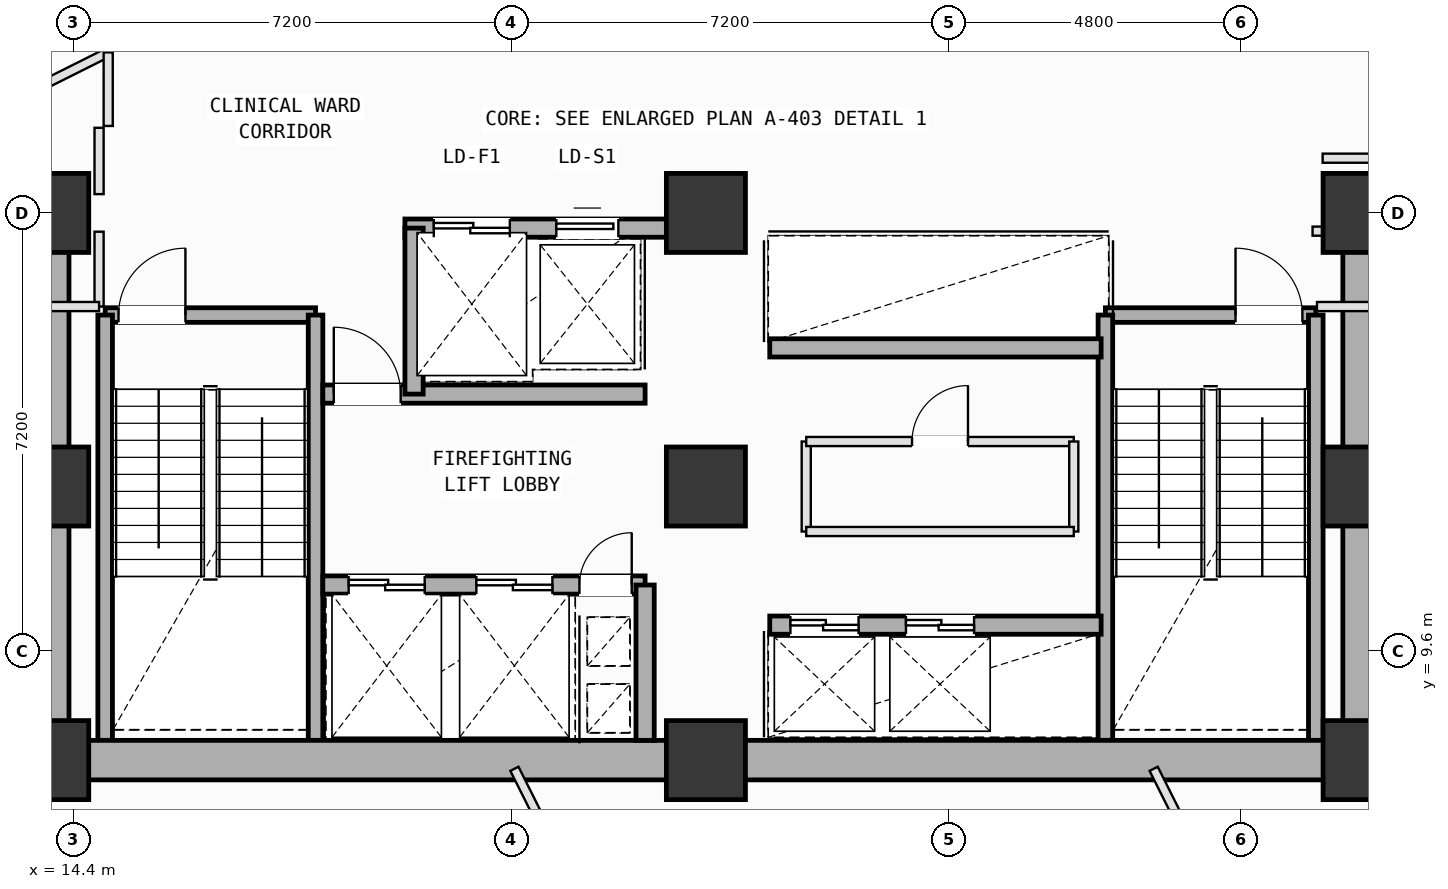
"""IFC4 building model, lengths in metres.
Left out: names, types, materials, properties, quantities, classifications, styles, units other than length and angle.
Written with IfcOpenShell. Run it as: python <this file> out.ifc"""

import sys

from ifc_helpers import new_model, si_unit, direction, frame, frame_2d, origin, origin_2d, place, context, subcontext, project, spatial, rectangle, extrude, element, fill, save


model = new_model("IFC4")
c1 = context("Model", 3, precision=1e-05, world=origin(), true_north=direction((0.0, 1.0)))
c2 = subcontext(c1, "Body", "Model", "MODEL_VIEW")
j1 = project(units=[si_unit("LENGTHUNIT", "METRE"), si_unit("PLANEANGLEUNIT", "RADIAN")], contexts=[c1])
p1 = place(None, origin())
s1 = spatial("IfcSite", under=j1, at=p1, CompositionType="ELEMENT")
p2 = place(p1, origin())
s2 = spatial("IfcBuilding", under=s1, at=p2, CompositionType="ELEMENT")
p3 = place(p2, frame((0.0, 0.0, 136.4)))
s3 = spatial("IfcBuildingStorey", under=s2, at=p3, CompositionType="ELEMENT", Elevation=136.4)
for number, where, z_axis, x_axis in (
    (1, (14.0, 7.8, 0.0), (0.0, 0.0, 1.0), (1.0, 0.0, 0.0)),
    (2, (14.0, 12.3, 0.0), (0.0, 0.0, 1.0), (1.0, 0.0, 0.0)),
    (3, (14.0, 16.8, 0.0), (0.0, 0.0, 1.0), (1.0, 0.0, 0.0)),
    (4, (24.8, 7.8, 0.0), (0.0, 0.0, 1.0), (1.0, 0.0, 0.0)),
    (5, (24.8, 12.3, 0.0), (0.0, 0.0, 1.0), (1.0, 0.0, 0.0)),
    (6, (24.8, 16.8, 0.0), (0.0, 0.0, 1.0), (1.0, 0.0, 0.0)),
    (7, (35.6, 7.8, 0.0), (0.0, 0.0, 1.0), (1.0, 0.0, 0.0)),
    (8, (35.6, 12.3, 0.0), (0.0, 0.0, 1.0), (1.0, 0.0, 0.0)),
    (9, (35.6, 16.8, 0.0), (0.0, 0.0, 1.0), (1.0, 0.0, 0.0)),
):
    element("IfcColumn", number, at=place(p3, frame(where, z_axis=z_axis, x_axis=x_axis)), inside=s3, PredefinedType="COLUMN", context=c2, shape_type="SweptSolid", body=[
        extrude(rectangle(XDim=1.3, YDim=1.3, at=origin_2d()), origin(), (0.0, 0.0, 1.0), 4.0),
    ])
p4 = place(p3, frame((14.92, 15.12, 0.0), z_axis=(0.0, 0.0, 1.0), x_axis=(1.0, 0.0, 0.0)))
e10 = element("IfcWall", 10, at=p4, inside=s3, PredefinedType="SOLIDWALL", context=c2, shape_type="SweptSolid", body=[
    extrude(rectangle(XDim=3.46, YDim=0.24, at=frame_2d((1.73, 0.0))), origin(), (0.0, 0.0, 1.0), 3.78),
])
p5 = place(p4, frame((0.22, 0.0, 0.0)))
e11 = element("IfcOpeningElement", 11, at=p5, cuts=e10, PredefinedType="OPENING", context=c2, shape_type="SweptSolid", body=[
    extrude(rectangle(XDim=1.1, YDim=2.15, at=frame_2d((0.55, 1.075))), frame((0.0, 0.13, 0.0), z_axis=(0.0, -1.0, 0.0), x_axis=(1.0, 0.0, 0.0)), (0.0, 0.0, 1.0), 0.26),
])
for number, where, z_axis, x_axis in (
    (12, (18.38, 15.12, 0.0), (0.0, 0.0, 1.0), (0.0, -1.0, 0.0)),
    (13, (14.92, 8.125, 0.0), (0.0, 0.0, 1.0), (0.0, 1.0, 0.0)),
):
    element("IfcWall", number, at=place(p3, frame(where, z_axis=z_axis, x_axis=x_axis)), inside=s3, PredefinedType="SOLIDWALL", context=c2, shape_type="SweptSolid", body=[
        extrude(rectangle(XDim=6.995, YDim=0.24, at=frame_2d((3.498, 0.0))), origin(), (0.0, 0.0, 1.0), 3.78),
    ])
p6 = place(p3, frame((31.37, 15.12, 0.0), z_axis=(0.0, 0.0, 1.0), x_axis=(1.0, 0.0, 0.0)))
e14 = element("IfcWall", 14, at=p6, inside=s3, PredefinedType="SOLIDWALL", context=c2, shape_type="SweptSolid", body=[
    extrude(rectangle(XDim=3.46, YDim=0.24, at=frame_2d((1.73, 0.0))), origin(), (0.0, 0.0, 1.0), 3.78),
])
p7 = place(p6, frame((2.14, 0.0, 0.0)))
e15 = element("IfcOpeningElement", 15, at=p7, cuts=e14, PredefinedType="OPENING", context=c2, shape_type="SweptSolid", body=[
    extrude(rectangle(XDim=1.1, YDim=2.15, at=frame_2d((0.55, 1.075))), frame((0.0, 0.13, 0.0), z_axis=(0.0, -1.0, 0.0), x_axis=(1.0, 0.0, 0.0)), (0.0, 0.0, 1.0), 0.26),
])
for number, where, z_axis, x_axis in (
    (16, (34.83, 15.12, 0.0), (0.0, 0.0, 1.0), (0.0, -1.0, 0.0)),
    (17, (31.37, 8.125, 0.0), (0.0, 0.0, 1.0), (0.0, 1.0, 0.0)),
):
    element("IfcWall", number, at=place(p3, frame(where, z_axis=z_axis, x_axis=x_axis)), inside=s3, PredefinedType="SOLIDWALL", context=c2, shape_type="SweptSolid", body=[
        extrude(rectangle(XDim=6.995, YDim=0.24, at=frame_2d((3.498, 0.0))), origin(), (0.0, 0.0, 1.0), 3.78),
    ])
for number, where, z_axis, x_axis in (
    (18, (14.0, 7.8, 0.0), (0.0, 0.0, 1.0), (1.0, 0.0, 0.0)),
    (19, (24.8, 7.8, 0.0), (0.0, 0.0, 1.0), (1.0, 0.0, 0.0)),
):
    element("IfcWall", number, at=place(p3, frame(where, z_axis=z_axis, x_axis=x_axis)), inside=s3, PredefinedType="SHEAR", context=c2, shape_type="SweptSolid", body=[
        extrude(rectangle(XDim=10.8, YDim=0.65, at=frame_2d((5.4, 0.0))), origin(), (0.0, 0.0, 1.0), 3.78),
    ])
for number, where, z_axis, x_axis in (
    (20, (35.6, 7.8, 0.0), (0.0, 0.0, 1.0), (0.0, 1.0, 0.0)),
    (21, (14.0, 16.8, 0.0), (0.0, 0.0, 1.0), (0.0, -1.0, 0.0)),
):
    element("IfcWall", number, at=place(p3, frame(where, z_axis=z_axis, x_axis=x_axis)), inside=s3, PredefinedType="SHEAR", context=c2, shape_type="SweptSolid", body=[
        extrude(rectangle(XDim=9.0, YDim=0.65, at=frame_2d((4.5, 0.0))), origin(), (0.0, 0.0, 1.0), 3.78),
    ])
p8 = place(p3, frame((19.85, 16.55, 0.0), z_axis=(0.0, 0.0, 1.0), x_axis=(1.0, 0.0, 0.0)))
e22 = element("IfcWall", 22, at=p8, inside=s3, PredefinedType="SOLIDWALL", context=c2, shape_type="SweptSolid", body=[
    extrude(rectangle(XDim=4.3, YDim=0.3, at=frame_2d((2.15, 0.0))), origin(), (0.0, 0.0, 1.0), 3.78),
])
p9 = place(p8, frame((0.475, 0.0, 0.0)))
e23 = element("IfcOpeningElement", 23, at=p9, cuts=e22, PredefinedType="OPENING", context=c2, shape_type="SweptSolid", body=[
    extrude(rectangle(XDim=1.25, YDim=2.18, at=frame_2d((0.625, 1.09))), frame((0.0, 0.16, 0.0), z_axis=(0.0, -1.0, 0.0), x_axis=(1.0, 0.0, 0.0)), (0.0, 0.0, 1.0), 0.32),
])
p10 = place(p8, frame((2.49, 0.0, 0.0)))
e24 = element("IfcOpeningElement", 24, at=p10, cuts=e22, PredefinedType="OPENING", context=c2, shape_type="SweptSolid", body=[
    extrude(rectangle(XDim=1.02, YDim=2.12, at=frame_2d((0.51, 1.06))), frame((0.0, 0.16, 0.0), z_axis=(0.0, -1.0, 0.0), x_axis=(1.0, 0.0, 0.0)), (0.0, 0.0, 1.0), 0.32),
])
p11 = place(p3, frame((18.5, 10.68, 0.0), z_axis=(0.0, 0.0, 1.0), x_axis=(1.0, 0.0, 0.0)))
e25 = element("IfcWall", 25, at=p11, inside=s3, PredefinedType="SOLIDWALL", context=c2, shape_type="SweptSolid", body=[
    extrude(rectangle(XDim=5.3, YDim=0.3, at=frame_2d((2.65, 0.0))), origin(), (0.0, 0.0, 1.0), 3.78),
])
p12 = place(p11, frame((4.22, 0.0, 0.0)))
e26 = element("IfcOpeningElement", 26, at=p12, cuts=e25, PredefinedType="OPENING", context=c2, shape_type="SweptSolid", body=[
    extrude(rectangle(XDim=0.86, YDim=2.06, at=frame_2d((0.43, 1.03))), frame((0.0, 0.16, 0.0), z_axis=(0.0, -1.0, 0.0), x_axis=(1.0, 0.0, 0.0)), (0.0, 0.0, 1.0), 0.32),
])
p13 = place(p11, frame((0.425, 0.0, 0.0)))
e27 = element("IfcOpeningElement", 27, at=p13, cuts=e25, PredefinedType="OPENING", context=c2, shape_type="SweptSolid", body=[
    extrude(rectangle(XDim=1.25, YDim=2.18, at=frame_2d((0.625, 1.09))), frame((0.0, 0.16, 0.0), z_axis=(0.0, -1.0, 0.0), x_axis=(1.0, 0.0, 0.0)), (0.0, 0.0, 1.0), 0.32),
])
p14 = place(p11, frame((2.525, 0.0, 0.0)))
e28 = element("IfcOpeningElement", 28, at=p14, cuts=e25, PredefinedType="OPENING", context=c2, shape_type="SweptSolid", body=[
    extrude(rectangle(XDim=1.25, YDim=2.18, at=frame_2d((0.625, 1.09))), frame((0.0, 0.16, 0.0), z_axis=(0.0, -1.0, 0.0), x_axis=(1.0, 0.0, 0.0)), (0.0, 0.0, 1.0), 0.32),
])
p15 = place(p3, frame((18.5, 13.82, 0.0), z_axis=(0.0, 0.0, 1.0), x_axis=(1.0, 0.0, 0.0)))
e29 = element("IfcWall", 29, at=p15, inside=s3, PredefinedType="SOLIDWALL", context=c2, shape_type="SweptSolid", body=[
    extrude(rectangle(XDim=5.3, YDim=0.3, at=frame_2d((2.65, 0.0))), origin(), (0.0, 0.0, 1.0), 3.78),
])
p16 = place(p15, frame((0.18, 0.0, 0.0)))
e30 = element("IfcOpeningElement", 30, at=p16, cuts=e29, PredefinedType="OPENING", context=c2, shape_type="SweptSolid", body=[
    extrude(rectangle(XDim=1.1, YDim=2.15, at=frame_2d((0.55, 1.075))), frame((0.0, 0.16, 0.0), z_axis=(0.0, -1.0, 0.0), x_axis=(1.0, 0.0, 0.0)), (0.0, 0.0, 1.0), 0.32),
])
p17 = place(p3, frame((23.8, 8.125, 0.0), z_axis=(0.0, 0.0, 1.0), x_axis=(0.0, 1.0, 0.0)))
e31 = element("IfcWall", 31, at=p17, inside=s3, PredefinedType="SOLIDWALL", context=c2, shape_type="SweptSolid", body=[
    extrude(rectangle(XDim=2.555, YDim=0.3, at=frame_2d((1.277, 0.0))), origin(), (0.0, 0.0, 1.0), 3.78),
])
p18 = place(p3, frame((20.0, 13.82, 0.0), z_axis=(0.0, 0.0, 1.0), x_axis=(0.0, 1.0, 0.0)))
e32 = element("IfcWall", 32, at=p18, inside=s3, PredefinedType="SOLIDWALL", context=c2, shape_type="SweptSolid", body=[
    extrude(rectangle(XDim=2.73, YDim=0.3, at=frame_2d((1.365, 0.0))), origin(), (0.0, 0.0, 1.0), 3.78),
])
p19 = place(p3, frame((25.85, 10.02, 0.0), z_axis=(0.0, 0.0, 1.0), x_axis=(1.0, 0.0, 0.0)))
e33 = element("IfcWall", 33, at=p19, inside=s3, PredefinedType="SOLIDWALL", context=c2, shape_type="SweptSolid", body=[
    extrude(rectangle(XDim=5.45, YDim=0.3, at=frame_2d((2.725, 0.0))), origin(), (0.0, 0.0, 1.0), 3.78),
])
p20 = place(p19, frame((0.34, 0.0, 0.0)))
e34 = element("IfcOpeningElement", 34, at=p20, cuts=e33, PredefinedType="OPENING", context=c2, shape_type="SweptSolid", body=[
    extrude(rectangle(XDim=1.12, YDim=2.15, at=frame_2d((0.56, 1.075))), frame((0.0, 0.16, 0.0), z_axis=(0.0, -1.0, 0.0), x_axis=(1.0, 0.0, 0.0)), (0.0, 0.0, 1.0), 0.32),
])
p21 = place(p19, frame((2.24, 0.0, 0.0)))
e35 = element("IfcOpeningElement", 35, at=p21, cuts=e33, PredefinedType="OPENING", context=c2, shape_type="SweptSolid", body=[
    extrude(rectangle(XDim=1.12, YDim=2.15, at=frame_2d((0.56, 1.075))), frame((0.0, 0.16, 0.0), z_axis=(0.0, -1.0, 0.0), x_axis=(1.0, 0.0, 0.0)), (0.0, 0.0, 1.0), 0.32),
])
p22 = place(p3, frame((25.85, 14.58, 0.0), z_axis=(0.0, 0.0, 1.0), x_axis=(1.0, 0.0, 0.0)))
e36 = element("IfcWall", 36, at=p22, inside=s3, PredefinedType="SOLIDWALL", context=c2, shape_type="SweptSolid", body=[
    extrude(rectangle(XDim=5.45, YDim=0.3, at=frame_2d((2.725, 0.0))), origin(), (0.0, 0.0, 1.0), 3.78),
])
p23 = place(p3, frame((26.45, 11.56, 0.0), z_axis=(0.0, 0.0, 1.0), x_axis=(0.0, 1.0, 0.0)))
e37 = element("IfcWall", 37, at=p23, inside=s3, PredefinedType="PARTITIONING", context=c2, shape_type="SweptSolid", body=[
    extrude(rectangle(XDim=1.48, YDim=0.15, at=frame_2d((0.74, 0.0))), origin(), (0.0, 0.0, 1.0), 3.78),
])
p24 = place(p3, frame((26.45, 13.04, 0.0), z_axis=(0.0, 0.0, 1.0), x_axis=(1.0, 0.0, 0.0)))
e38 = element("IfcWall", 38, at=p24, inside=s3, PredefinedType="PARTITIONING", context=c2, shape_type="SweptSolid", body=[
    extrude(rectangle(XDim=4.4, YDim=0.15, at=frame_2d((2.2, 0.0))), origin(), (0.0, 0.0, 1.0), 3.78),
])
p25 = place(p24, frame((1.74, 0.0, 0.0)))
e39 = element("IfcOpeningElement", 39, at=p25, cuts=e38, PredefinedType="OPENING", context=c2, shape_type="SweptSolid", body=[
    extrude(rectangle(XDim=0.92, YDim=2.1, at=frame_2d((0.46, 1.05))), frame((0.0, 0.085, 0.0), z_axis=(0.0, -1.0, 0.0), x_axis=(1.0, 0.0, 0.0)), (0.0, 0.0, 1.0), 0.17),
])
p26 = place(p3, frame((30.85, 13.04, 0.0), z_axis=(0.0, 0.0, 1.0), x_axis=(0.0, -1.0, 0.0)))
e40 = element("IfcWall", 40, at=p26, inside=s3, PredefinedType="PARTITIONING", context=c2, shape_type="SweptSolid", body=[
    extrude(rectangle(XDim=1.48, YDim=0.15, at=frame_2d((0.74, 0.0))), origin(), (0.0, 0.0, 1.0), 3.78),
])
p27 = place(p3, frame((30.85, 11.56, 0.0), z_axis=(0.0, 0.0, 1.0), x_axis=(-1.0, 0.0, 0.0)))
e41 = element("IfcWall", 41, at=p27, inside=s3, PredefinedType="PARTITIONING", context=c2, shape_type="SweptSolid", body=[
    extrude(rectangle(XDim=4.4, YDim=0.15, at=frame_2d((2.2, 0.0))), origin(), (0.0, 0.0, 1.0), 3.78),
])
p28 = place(p3, frame((21.651, 7.657, 0.0), z_axis=(0.0, 0.0, 1.0), x_axis=(0.447808912085, -0.894129284979, 0.0)))
e42 = element("IfcWall", 42, at=p28, inside=s3, PredefinedType="PARTITIONING", context=c2, shape_type="SweptSolid", body=[
    extrude(rectangle(XDim=12.137, YDim=0.15, at=frame_2d((6.068, 0.0))), origin(), (0.0, 0.0, 1.0), 3.78),
])
p29 = place(p3, frame((32.164, 7.657, 0.0), z_axis=(0.0, 0.0, 1.0), x_axis=(0.447686753876, -0.89419045533, 0.0)))
e43 = element("IfcWall", 43, at=p29, inside=s3, PredefinedType="PARTITIONING", context=c2, shape_type="SweptSolid", body=[
    extrude(rectangle(XDim=7.429, YDim=0.15, at=frame_2d((3.715, 0.0))), origin(), (0.0, 0.0, 1.0), 3.78),
])
p30 = place(p29, frame((3.452, 0.0, 0.0)))
e44 = element("IfcOpeningElement", 44, at=p30, cuts=e43, PredefinedType="OPENING", context=c2, shape_type="SweptSolid", body=[
    extrude(rectangle(XDim=0.86, YDim=2.06, at=frame_2d((0.43, 1.03))), frame((0.0, 0.085, 0.0), z_axis=(0.0, -1.0, 0.0), x_axis=(1.0, 0.0, 0.0)), (0.0, 0.0, 1.0), 0.17),
])
p31 = place(p3, frame((35.6, 7.5, 0.0), z_axis=(0.0, 0.0, 1.0), x_axis=(1.0, 0.0, 0.0)))
e45 = element("IfcWall", 45, at=p31, inside=s3, PredefinedType="PARTITIONING", context=c2, shape_type="SweptSolid", body=[
    extrude(rectangle(XDim=0.55, YDim=0.15, at=frame_2d((0.275, 0.0))), origin(), (0.0, 0.0, 1.0), 2.965),
])
p32 = place(p3, frame((34.777, 16.5, 0.0), z_axis=(0.0, 0.0, 1.0), x_axis=(1.0, 0.0, 0.0)))
e46 = element("IfcWall", 46, at=p32, inside=s3, PredefinedType="PARTITIONING", context=c2, shape_type="SweptSolid", body=[
    extrude(rectangle(XDim=1.723, YDim=0.15, at=frame_2d((0.861, 0.0))), origin(), (0.0, 0.0, 1.0), 2.965),
])
p33 = place(p3, frame((36.5, 17.7, 0.0), z_axis=(0.0, 0.0, 1.0), x_axis=(-1.0, 0.0, 0.0)))
e47 = element("IfcWall", 47, at=p33, inside=s3, PredefinedType="PARTITIONING", context=c2, shape_type="SweptSolid", body=[
    extrude(rectangle(XDim=1.557, YDim=0.15, at=frame_2d((0.778, 0.0))), origin(), (0.0, 0.0, 1.0), 3.78),
])
p34 = place(p3, frame((36.15, 15.26, 0.0), z_axis=(0.0, 0.0, 1.0), x_axis=(-1.0, 0.0, 0.0)))
e48 = element("IfcWall", 48, at=p34, inside=s3, PredefinedType="PARTITIONING", context=c2, shape_type="SweptSolid", body=[
    extrude(rectangle(XDim=1.3, YDim=0.15, at=frame_2d((0.65, 0.0))), origin(), (0.0, 0.0, 1.0), 3.78),
])
p35 = place(p3, frame((14.82, 18.2, 0.0), z_axis=(0.0, 0.0, 1.0), x_axis=(0.0, -1.0, 0.0)))
e49 = element("IfcWall", 49, at=p35, inside=s3, PredefinedType="PARTITIONING", context=c2, shape_type="SweptSolid", body=[
    extrude(rectangle(XDim=1.091, YDim=0.15, at=frame_2d((0.545, 0.0))), origin(), (0.0, 0.0, 1.0), 3.78),
])
p36 = place(p3, frame((14.82, 16.491, 0.0), z_axis=(0.0, 0.0, 1.0), x_axis=(0.0, -1.0, 0.0)))
e50 = element("IfcWall", 50, at=p36, inside=s3, PredefinedType="PARTITIONING", context=c2, shape_type="SweptSolid", body=[
    extrude(rectangle(XDim=1.231, YDim=0.15, at=frame_2d((0.615, 0.0))), origin(), (0.0, 0.0, 1.0), 3.78),
])
p37 = place(p3, frame((14.82, 15.26, 0.0), z_axis=(0.0, 0.0, 1.0), x_axis=(-1.0, 0.0, 0.0)))
e51 = element("IfcWall", 51, at=p37, inside=s3, PredefinedType="PARTITIONING", context=c2, shape_type="SweptSolid", body=[
    extrude(rectangle(XDim=1.12, YDim=0.15, at=frame_2d((0.56, 0.0))), origin(), (0.0, 0.0, 1.0), 3.78),
])
p38 = place(p3, frame((7.587, 15.744, 0.0), z_axis=(0.0, 0.0, 1.0), x_axis=(0.894160922131, 0.447745737371, 0.0)))
e52 = element("IfcWall", 52, at=p38, inside=s3, PredefinedType="PARTITIONING", context=c2, shape_type="SweptSolid", body=[
    extrude(rectangle(XDim=8.257, YDim=0.15, at=frame_2d((4.128, 0.0))), origin(), (0.0, 0.0, 1.0), 3.78),
])
p39 = place(p38, frame((3.529, 0.0, 0.0)))
e53 = element("IfcOpeningElement", 53, at=p39, cuts=e52, PredefinedType="OPENING", context=c2, shape_type="SweptSolid", body=[
    extrude(rectangle(XDim=1.2, YDim=2.15, at=frame_2d((0.6, 1.075))), frame((0.0, 0.085, 0.0), z_axis=(0.0, -1.0, 0.0), x_axis=(1.0, 0.0, 0.0)), (0.0, 0.0, 1.0), 0.17),
])
p40 = place(p3, frame((14.97, 19.441, 0.0), z_axis=(0.0, 0.0, 1.0), x_axis=(0.0, -1.0, 0.0)))
e54 = element("IfcWall", 54, at=p40, inside=s3, PredefinedType="PARTITIONING", context=c2, shape_type="SweptSolid", body=[
    extrude(rectangle(XDim=1.211, YDim=0.15, at=frame_2d((0.605, 0.0))), origin(), (0.0, 0.0, 1.0), 2.965),
])
p41 = place(p5, origin())
e55 = element("IfcDoor", 55, at=p41, inside=s3, OperationType="SINGLE_SWING_RIGHT", PredefinedType="DOOR", context=c2, shape_type="SweptSolid", body=[
    extrude(rectangle(XDim=1.1, YDim=2.15, at=frame_2d((0.55, 1.075))), frame((0.0, 0.025, 0.0), z_axis=(0.0, -1.0, 0.0), x_axis=(1.0, 0.0, 0.0)), (0.0, 0.0, 1.0), 0.05),
])
fill(e11, e55)
p42 = place(p7, origin())
e56 = element("IfcDoor", 56, at=p42, inside=s3, OperationType="SINGLE_SWING_LEFT", PredefinedType="DOOR", context=c2, shape_type="SweptSolid", body=[
    extrude(rectangle(XDim=1.1, YDim=2.15, at=frame_2d((0.55, 1.075))), frame((0.0, 0.025, 0.0), z_axis=(0.0, -1.0, 0.0), x_axis=(1.0, 0.0, 0.0)), (0.0, 0.0, 1.0), 0.05),
])
fill(e15, e56)
p43 = place(p12, origin())
e57 = element("IfcDoor", 57, at=p43, inside=s3, OperationType="SINGLE_SWING_RIGHT", PredefinedType="DOOR", context=c2, shape_type="SweptSolid", body=[
    extrude(rectangle(XDim=0.86, YDim=2.06, at=frame_2d((0.43, 1.03))), frame((0.0, 0.025, 0.0), z_axis=(0.0, -1.0, 0.0), x_axis=(1.0, 0.0, 0.0)), (0.0, 0.0, 1.0), 0.05),
])
fill(e26, e57)
p44 = place(p16, origin())
e58 = element("IfcDoor", 58, at=p44, inside=s3, OperationType="SINGLE_SWING_LEFT", PredefinedType="DOOR", context=c2, shape_type="SweptSolid", body=[
    extrude(rectangle(XDim=1.1, YDim=2.15, at=frame_2d((0.55, 1.075))), frame((0.0, 0.025, 0.0), z_axis=(0.0, -1.0, 0.0), x_axis=(1.0, 0.0, 0.0)), (0.0, 0.0, 1.0), 0.05),
])
fill(e30, e58)
p45 = place(p13, origin())
e59 = element("IfcDoor", 59, at=p45, inside=s3, OperationType="DOUBLE_DOOR_SLIDING", PredefinedType="DOOR", context=c2, shape_type="SweptSolid", body=[
    extrude(rectangle(XDim=1.25, YDim=2.18, at=frame_2d((0.625, 1.09))), frame((0.0, 0.025, 0.0), z_axis=(0.0, -1.0, 0.0), x_axis=(1.0, 0.0, 0.0)), (0.0, 0.0, 1.0), 0.05),
])
fill(e27, e59)
p46 = place(p14, origin())
e60 = element("IfcDoor", 60, at=p46, inside=s3, OperationType="DOUBLE_DOOR_SLIDING", PredefinedType="DOOR", context=c2, shape_type="SweptSolid", body=[
    extrude(rectangle(XDim=1.25, YDim=2.18, at=frame_2d((0.625, 1.09))), frame((0.0, 0.025, 0.0), z_axis=(0.0, -1.0, 0.0), x_axis=(1.0, 0.0, 0.0)), (0.0, 0.0, 1.0), 0.05),
])
fill(e28, e60)
p47 = place(p20, origin())
e61 = element("IfcDoor", 61, at=p47, inside=s3, OperationType="DOUBLE_DOOR_SLIDING", PredefinedType="DOOR", context=c2, shape_type="SweptSolid", body=[
    extrude(rectangle(XDim=1.12, YDim=2.15, at=frame_2d((0.56, 1.075))), frame((0.0, 0.025, 0.0), z_axis=(0.0, -1.0, 0.0), x_axis=(1.0, 0.0, 0.0)), (0.0, 0.0, 1.0), 0.05),
])
fill(e34, e61)
p48 = place(p21, origin())
e62 = element("IfcDoor", 62, at=p48, inside=s3, OperationType="DOUBLE_DOOR_SLIDING", PredefinedType="DOOR", context=c2, shape_type="SweptSolid", body=[
    extrude(rectangle(XDim=1.12, YDim=2.15, at=frame_2d((0.56, 1.075))), frame((0.0, 0.025, 0.0), z_axis=(0.0, -1.0, 0.0), x_axis=(1.0, 0.0, 0.0)), (0.0, 0.0, 1.0), 0.05),
])
fill(e35, e62)
p49 = place(p9, origin())
e63 = element("IfcDoor", 63, at=p49, inside=s3, OperationType="DOUBLE_DOOR_SLIDING", PredefinedType="DOOR", context=c2, shape_type="SweptSolid", body=[
    extrude(rectangle(XDim=1.25, YDim=2.18, at=frame_2d((0.625, 1.09))), frame((0.0, 0.025, 0.0), z_axis=(0.0, -1.0, 0.0), x_axis=(1.0, 0.0, 0.0)), (0.0, 0.0, 1.0), 0.05),
])
fill(e23, e63)
p50 = place(p10, origin())
e64 = element("IfcDoor", 64, at=p50, inside=s3, OperationType="SLIDING_TO_LEFT", PredefinedType="DOOR", context=c2, shape_type="SweptSolid", body=[
    extrude(rectangle(XDim=1.02, YDim=2.12, at=frame_2d((0.51, 1.06))), frame((0.0, 0.025, 0.0), z_axis=(0.0, -1.0, 0.0), x_axis=(1.0, 0.0, 0.0)), (0.0, 0.0, 1.0), 0.05),
])
fill(e24, e64)
p51 = place(p25, origin())
e65 = element("IfcDoor", 65, at=p51, inside=s3, OperationType="SINGLE_SWING_RIGHT", PredefinedType="DOOR", context=c2, shape_type="SweptSolid", body=[
    extrude(rectangle(XDim=0.92, YDim=2.1, at=frame_2d((0.46, 1.05))), frame((0.0, 0.025, 0.0), z_axis=(0.0, -1.0, 0.0), x_axis=(1.0, 0.0, 0.0)), (0.0, 0.0, 1.0), 0.05),
])
fill(e39, e65)
save(model, sys.argv[1])
